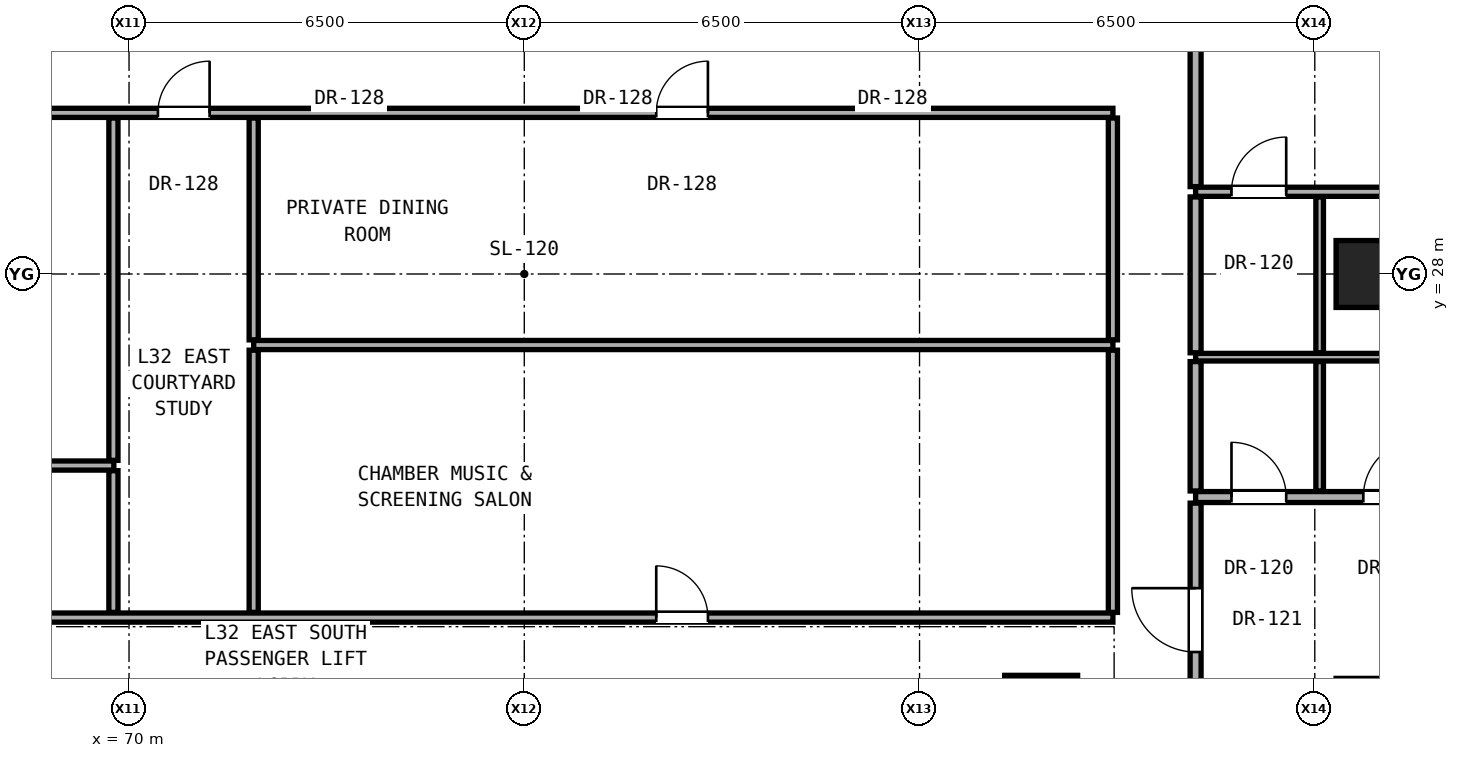
"""IFC4 building model, lengths in metres.
Left out: names, types, materials, properties, quantities, classifications, styles, units other than length and angle.
Written with IfcOpenShell. Run it as: python <this file> out.ifc"""

import sys

from ifc_helpers import new_model, si_unit, direction, frame, frame_2d, origin, origin_2d, place, context, subcontext, project, spatial, rectangle, hollow_rectangle, extrude, element, fill, save


model = new_model("IFC4")
c1 = context("Model", 3, precision=1e-05, world=origin(), true_north=direction((0.0, 1.0)))
c2 = subcontext(c1, "Body", "Model", "MODEL_VIEW")
j1 = project(units=[si_unit("LENGTHUNIT", "METRE"), si_unit("PLANEANGLEUNIT", "RADIAN")], contexts=[c1])
p1 = place(None, origin())
s1 = spatial("IfcSite", under=j1, at=p1, CompositionType="ELEMENT")
p2 = place(p1, origin())
s2 = spatial("IfcBuilding", under=s1, at=p2, CompositionType="ELEMENT")
p3 = place(p2, frame((0.0, 0.0, 114.8)))
s3 = spatial("IfcBuildingStorey", under=s2, at=p3, CompositionType="ELEMENT", Elevation=114.8)
p4 = place(p3, frame((85.0, 20.8, 0.0), z_axis=(0.0, 0.0, 1.0), x_axis=(1.0, 0.0, 0.0)))
e1 = element("IfcColumn", 1, at=p4, inside=s3, PredefinedType="COLUMN", context=c2, shape_type="SweptSolid", body=[
    extrude(rectangle(XDim=1.2, YDim=1.2, at=origin_2d()), origin(), (0.0, 0.0, 1.0), 3.3),
])
p5 = place(p3, frame((90.4, 28.0, 0.0), z_axis=(0.0, 0.0, 1.0), x_axis=(1.0, 0.0, 0.0)))
e2 = element("IfcColumn", 2, at=p5, inside=s3, PredefinedType="COLUMN", context=c2, shape_type="SweptSolid", body=[
    extrude(hollow_rectangle(XDim=1.1, YDim=1.1, WallThickness=0.06, at=origin_2d()), origin(), (0.0, 0.0, 1.0), 3.3),
])
p6 = place(p3, frame((66.68, 22.35, 0.0), z_axis=(0.0, 0.0, 1.0), x_axis=(1.0, 0.0, 0.0)))
e3 = element("IfcWall", 3, at=p6, inside=s3, PredefinedType="PARTITIONING", context=c2, shape_type="SweptSolid", body=[
    extrude(rectangle(XDim=19.5, YDim=0.15, at=frame_2d((9.75, 0.0))), origin(), (0.0, 0.0, 1.0), 2.145),
])
p7 = place(p6, frame((11.99, 0.0, 0.0)))
e4 = element("IfcOpeningElement", 4, at=p7, cuts=e3, PredefinedType="OPENING", context=c2, shape_type="SweptSolid", body=[
    extrude(rectangle(XDim=0.85, YDim=2.01, at=frame_2d((0.425, 1.005))), frame((0.0, 0.085, 0.0), z_axis=(0.0, -1.0, 0.0), x_axis=(1.0, 0.0, 0.0)), (0.0, 0.0, 1.0), 0.17),
])
p8 = place(p3, frame((87.54, 24.332, 0.0), z_axis=(0.0, 0.0, 1.0), x_axis=(1.0, 0.0, 0.0)))
e5 = element("IfcWall", 5, at=p8, inside=s3, PredefinedType="PARTITIONING", context=c2, shape_type="SweptSolid", body=[
    extrude(rectangle(XDim=8.006, YDim=0.18, at=frame_2d((4.003, 0.0))), origin(), (0.0, 0.0, 1.0), 2.216),
])
p9 = place(p8, frame((5.721, 0.0, 0.0)))
e6 = element("IfcOpeningElement", 6, at=p9, cuts=e5, PredefinedType="OPENING", context=c2, shape_type="SweptSolid", body=[
    extrude(rectangle(XDim=0.95, YDim=2.15, at=frame_2d((0.475, 1.075))), frame((0.0, 0.1, 0.0), z_axis=(0.0, -1.0, 0.0), x_axis=(1.0, 0.0, 0.0)), (0.0, 0.0, 1.0), 0.2),
])
p10 = place(p8, frame((2.758, 0.0, 0.0)))
e7 = element("IfcOpeningElement", 7, at=p10, cuts=e5, PredefinedType="OPENING", context=c2, shape_type="SweptSolid", body=[
    extrude(rectangle(XDim=0.95, YDim=2.15, at=frame_2d((0.475, 1.075))), frame((0.0, 0.1, 0.0), z_axis=(0.0, -1.0, 0.0), x_axis=(1.0, 0.0, 0.0)), (0.0, 0.0, 1.0), 0.2),
])
p11 = place(p8, frame((0.59, 0.0, 0.0)))
e8 = element("IfcOpeningElement", 8, at=p11, cuts=e5, PredefinedType="OPENING", context=c2, shape_type="SweptSolid", body=[
    extrude(rectangle(XDim=0.9, YDim=2.1, at=frame_2d((0.45, 1.05))), frame((0.0, 0.1, 0.0), z_axis=(0.0, -1.0, 0.0), x_axis=(1.0, 0.0, 0.0)), (0.0, 0.0, 1.0), 0.2),
])
p12 = place(p3, frame((66.68, 24.85, 0.0), z_axis=(0.0, 0.0, 1.0), x_axis=(1.0, 0.0, 0.0)))
e9 = element("IfcWall", 9, at=p12, inside=s3, PredefinedType="PARTITIONING", context=c2, shape_type="SweptSolid", body=[
    extrude(rectangle(XDim=3.07, YDim=0.15, at=frame_2d((1.535, 0.0))), origin(), (0.0, 0.0, 1.0), 2.145),
])
p13 = place(p3, frame((87.54, 26.632, 0.0), z_axis=(0.0, 0.0, 1.0), x_axis=(1.0, 0.0, 0.0)))
e10 = element("IfcWall", 10, at=p13, inside=s3, PredefinedType="PARTITIONING", context=c2, shape_type="SweptSolid", body=[
    extrude(rectangle(XDim=8.006, YDim=0.125, at=frame_2d((4.003, 0.0))), origin(), (0.0, 0.0, 1.0), 2.216),
])
p14 = place(p3, frame((72.05, 26.832, 0.0), z_axis=(0.0, 0.0, 1.0), x_axis=(1.0, 0.0, 0.0)))
e11 = element("IfcWall", 11, at=p14, inside=s3, PredefinedType="PARTITIONING", context=c2, shape_type="SweptSolid", body=[
    extrude(rectangle(XDim=14.13, YDim=0.15, at=frame_2d((7.065, 0.0))), origin(), (0.0, 0.0, 1.0), 2.145),
])
p15 = place(p3, frame((87.54, 29.352, 0.0), z_axis=(0.0, 0.0, 1.0), x_axis=(1.0, 0.0, 0.0)))
e12 = element("IfcWall", 12, at=p15, inside=s3, PredefinedType="PARTITIONING", context=c2, shape_type="SweptSolid", body=[
    extrude(rectangle(XDim=8.006, YDim=0.15, at=frame_2d((4.003, 0.0))), origin(), (0.0, 0.0, 1.0), 2.216),
])
p16 = place(p15, frame((4.528, 0.0, 0.0)))
e13 = element("IfcOpeningElement", 13, at=p16, cuts=e12, PredefinedType="OPENING", context=c2, shape_type="SweptSolid", body=[
    extrude(rectangle(XDim=0.95, YDim=2.15, at=frame_2d((0.475, 1.075))), frame((0.0, 0.085, 0.0), z_axis=(0.0, -1.0, 0.0), x_axis=(1.0, 0.0, 0.0)), (0.0, 0.0, 1.0), 0.17),
])
p17 = place(p15, frame((0.59, 0.0, 0.0)))
e14 = element("IfcOpeningElement", 14, at=p17, cuts=e12, PredefinedType="OPENING", context=c2, shape_type="SweptSolid", body=[
    extrude(rectangle(XDim=0.9, YDim=2.1, at=frame_2d((0.45, 1.05))), frame((0.0, 0.085, 0.0), z_axis=(0.0, -1.0, 0.0), x_axis=(1.0, 0.0, 0.0)), (0.0, 0.0, 1.0), 0.17),
])
p18 = place(p3, frame((66.68, 30.65, 0.0), z_axis=(0.0, 0.0, 1.0), x_axis=(1.0, 0.0, 0.0)))
e15 = element("IfcWall", 15, at=p18, inside=s3, PredefinedType="PARTITIONING", context=c2, shape_type="SweptSolid", body=[
    extrude(rectangle(XDim=19.5, YDim=0.15, at=frame_2d((9.75, 0.0))), origin(), (0.0, 0.0, 1.0), 2.145),
])
p19 = place(p18, frame((3.795, 0.0, 0.0)))
e16 = element("IfcOpeningElement", 16, at=p19, cuts=e15, PredefinedType="OPENING", context=c2, shape_type="SweptSolid", body=[
    extrude(rectangle(XDim=0.85, YDim=2.01, at=frame_2d((0.425, 1.005))), frame((0.0, 0.085, 0.0), z_axis=(0.0, -1.0, 0.0), x_axis=(1.0, 0.0, 0.0)), (0.0, 0.0, 1.0), 0.17),
])
p20 = place(p18, frame((11.99, 0.0, 0.0)))
e17 = element("IfcOpeningElement", 17, at=p20, cuts=e15, PredefinedType="OPENING", context=c2, shape_type="SweptSolid", body=[
    extrude(rectangle(XDim=0.85, YDim=2.01, at=frame_2d((0.425, 1.005))), frame((0.0, 0.085, 0.0), z_axis=(0.0, -1.0, 0.0), x_axis=(1.0, 0.0, 0.0)), (0.0, 0.0, 1.0), 0.17),
])
p21 = place(p3, frame((69.743, 22.435, 0.0), z_axis=(0.0, 0.0, 1.0), x_axis=(0.0, 1.0, 0.0)))
e18 = element("IfcWall", 18, at=p21, inside=s3, PredefinedType="PARTITIONING", context=c2, shape_type="SweptSolid", body=[
    extrude(rectangle(XDim=2.33, YDim=0.15, at=frame_2d((1.165, 0.0))), origin(), (0.0, 0.0, 1.0), 3.08),
])
p22 = place(p3, frame((69.743, 24.935, 0.0), z_axis=(0.0, 0.0, 1.0), x_axis=(0.0, 1.0, 0.0)))
e19 = element("IfcWall", 19, at=p22, inside=s3, PredefinedType="PARTITIONING", context=c2, shape_type="SweptSolid", body=[
    extrude(rectangle(XDim=5.63, YDim=0.15, at=frame_2d((2.815, 0.0))), origin(), (0.0, 0.0, 1.0), 2.145),
])
p23 = place(p3, frame((72.05, 22.435, 0.0), z_axis=(0.0, 0.0, 1.0), x_axis=(0.0, 1.0, 0.0)))
e20 = element("IfcWall", 20, at=p23, inside=s3, PredefinedType="PARTITIONING", context=c2, shape_type="SweptSolid", body=[
    extrude(rectangle(XDim=4.312, YDim=0.15, at=frame_2d((2.156, 0.0))), origin(), (0.0, 0.0, 1.0), 2.609),
])
p24 = place(p3, frame((72.05, 26.917, 0.0), z_axis=(0.0, 0.0, 1.0), x_axis=(0.0, 1.0, 0.0)))
e21 = element("IfcWall", 21, at=p24, inside=s3, PredefinedType="PARTITIONING", context=c2, shape_type="SweptSolid", body=[
    extrude(rectangle(XDim=3.648, YDim=0.15, at=frame_2d((1.824, 0.0))), origin(), (0.0, 0.0, 1.0), 2.145),
])
p25 = place(p3, frame((86.18, 22.435, 0.0), z_axis=(0.0, 0.0, 1.0), x_axis=(0.0, 1.0, 0.0)))
e22 = element("IfcWall", 22, at=p25, inside=s3, PredefinedType="PARTITIONING", context=c2, shape_type="SweptSolid", body=[
    extrude(rectangle(XDim=4.312, YDim=0.15, at=frame_2d((2.156, 0.0))), origin(), (0.0, 0.0, 1.0), 3.08),
])
p26 = place(p3, frame((86.18, 26.917, 0.0), z_axis=(0.0, 0.0, 1.0), x_axis=(0.0, 1.0, 0.0)))
e23 = element("IfcWall", 23, at=p26, inside=s3, PredefinedType="PARTITIONING", context=c2, shape_type="SweptSolid", body=[
    extrude(rectangle(XDim=3.648, YDim=0.15, at=frame_2d((1.824, 0.0))), origin(), (0.0, 0.0, 1.0), 2.299),
])
p27 = place(p3, frame((87.54, 20.385, 0.0), z_axis=(0.0, 0.0, 1.0), x_axis=(0.0, 1.0, 0.0)))
e24 = element("IfcWall", 24, at=p27, inside=s3, PredefinedType="PARTITIONING", context=c2, shape_type="SweptSolid", body=[
    extrude(rectangle(XDim=3.847, YDim=0.18, at=frame_2d((1.923, 0.0))), origin(), (0.0, 0.0, 1.0), 2.472),
])
p28 = place(p27, frame((1.398, 0.0, 0.0)))
e25 = element("IfcOpeningElement", 25, at=p28, cuts=e24, PredefinedType="OPENING", context=c2, shape_type="SweptSolid", body=[
    extrude(rectangle(XDim=1.05, YDim=2.2, at=frame_2d((0.525, 1.1))), frame((0.0, 0.1, 0.0), z_axis=(0.0, -1.0, 0.0), x_axis=(1.0, 0.0, 0.0)), (0.0, 0.0, 1.0), 0.2),
])
p29 = place(p3, frame((87.54, 24.432, 0.0), z_axis=(0.0, 0.0, 1.0), x_axis=(0.0, 1.0, 0.0)))
e26 = element("IfcWall", 26, at=p29, inside=s3, PredefinedType="PARTITIONING", context=c2, shape_type="SweptSolid", body=[
    extrude(rectangle(XDim=2.128, YDim=0.18, at=frame_2d((1.064, 0.0))), origin(), (0.0, 0.0, 1.0), 3.08),
])
p30 = place(p3, frame((87.54, 26.705, 0.0), z_axis=(0.0, 0.0, 1.0), x_axis=(0.0, 1.0, 0.0)))
e27 = element("IfcWall", 27, at=p30, inside=s3, PredefinedType="PARTITIONING", context=c2, shape_type="SweptSolid", body=[
    extrude(rectangle(XDim=2.562, YDim=0.18, at=frame_2d((1.281, 0.0))), origin(), (0.0, 0.0, 1.0), 2.299),
])
p31 = place(p3, frame((87.54, 29.437, 0.0), z_axis=(0.0, 0.0, 1.0), x_axis=(0.0, 1.0, 0.0)))
e28 = element("IfcWall", 28, at=p31, inside=s3, PredefinedType="PARTITIONING", context=c2, shape_type="SweptSolid", body=[
    extrude(rectangle(XDim=6.178, YDim=0.18, at=frame_2d((3.089, 0.0))), origin(), (0.0, 0.0, 1.0), 2.472),
])
p32 = place(p31, frame((2.564, 0.0, 0.0)))
e29 = element("IfcOpeningElement", 29, at=p32, cuts=e28, PredefinedType="OPENING", context=c2, shape_type="SweptSolid", body=[
    extrude(rectangle(XDim=1.05, YDim=2.2, at=frame_2d((0.525, 1.1))), frame((0.0, 0.1, 0.0), z_axis=(0.0, -1.0, 0.0), x_axis=(1.0, 0.0, 0.0)), (0.0, 0.0, 1.0), 0.2),
])
p33 = place(p3, frame((89.58, 24.432, 0.0), z_axis=(0.0, 0.0, 1.0), x_axis=(0.0, 1.0, 0.0)))
e30 = element("IfcWall", 30, at=p33, inside=s3, PredefinedType="PARTITIONING", context=c2, shape_type="SweptSolid", body=[
    extrude(rectangle(XDim=2.128, YDim=0.125, at=frame_2d((1.064, 0.0))), origin(), (0.0, 0.0, 1.0), 3.08),
])
p34 = place(p3, frame((89.58, 26.705, 0.0), z_axis=(0.0, 0.0, 1.0), x_axis=(0.0, 1.0, 0.0)))
e31 = element("IfcWall", 31, at=p34, inside=s3, PredefinedType="PARTITIONING", context=c2, shape_type="SweptSolid", body=[
    extrude(rectangle(XDim=2.562, YDim=0.125, at=frame_2d((1.281, 0.0))), origin(), (0.0, 0.0, 1.0), 2.299),
])
p35 = place(p28, origin())
e32 = element("IfcDoor", 32, at=p35, inside=s3, OperationType="SINGLE_SWING_RIGHT", PredefinedType="DOOR", context=c2, shape_type="SweptSolid", body=[
    extrude(rectangle(XDim=1.05, YDim=2.2, at=frame_2d((0.525, 1.1))), frame((0.0, 0.025, 0.0), z_axis=(0.0, -1.0, 0.0), x_axis=(1.0, 0.0, 0.0)), (0.0, 0.0, 1.0), 0.05),
])
fill(e25, e32)
p36 = place(p10, origin())
e33 = element("IfcDoor", 33, at=p36, inside=s3, OperationType="SINGLE_SWING_RIGHT", PredefinedType="DOOR", context=c2, shape_type="SweptSolid", body=[
    extrude(rectangle(XDim=0.95, YDim=2.15, at=frame_2d((0.475, 1.075))), frame((0.0, 0.025, 0.0), z_axis=(0.0, -1.0, 0.0), x_axis=(1.0, 0.0, 0.0)), (0.0, 0.0, 1.0), 0.05),
])
fill(e7, e33)
p37 = place(p11, origin())
e34 = element("IfcDoor", 34, at=p37, inside=s3, OperationType="SINGLE_SWING_LEFT", PredefinedType="DOOR", context=c2, shape_type="SweptSolid", body=[
    extrude(rectangle(XDim=0.9, YDim=2.1, at=frame_2d((0.45, 1.05))), frame((0.0, 0.025, 0.0), z_axis=(0.0, -1.0, 0.0), x_axis=(1.0, 0.0, 0.0)), (0.0, 0.0, 1.0), 0.05),
])
fill(e8, e34)
p38 = place(p17, origin())
e35 = element("IfcDoor", 35, at=p38, inside=s3, OperationType="SINGLE_SWING_RIGHT", PredefinedType="DOOR", context=c2, shape_type="SweptSolid", body=[
    extrude(rectangle(XDim=0.9, YDim=2.1, at=frame_2d((0.45, 1.05))), frame((0.0, 0.025, 0.0), z_axis=(0.0, -1.0, 0.0), x_axis=(1.0, 0.0, 0.0)), (0.0, 0.0, 1.0), 0.05),
])
fill(e14, e35)
p39 = place(p19, origin())
e36 = element("IfcDoor", 36, at=p39, inside=s3, OperationType="SINGLE_SWING_RIGHT", PredefinedType="DOOR", context=c2, shape_type="SweptSolid", body=[
    extrude(rectangle(XDim=0.85, YDim=2.01, at=frame_2d((0.425, 1.005))), frame((0.0, 0.025, 0.0), z_axis=(0.0, -1.0, 0.0), x_axis=(1.0, 0.0, 0.0)), (0.0, 0.0, 1.0), 0.05),
])
fill(e16, e36)
p40 = place(p7, origin())
e37 = element("IfcDoor", 37, at=p40, inside=s3, OperationType="SINGLE_SWING_LEFT", PredefinedType="DOOR", context=c2, shape_type="SweptSolid", body=[
    extrude(rectangle(XDim=0.85, YDim=2.01, at=frame_2d((0.425, 1.005))), frame((0.0, 0.025, 0.0), z_axis=(0.0, -1.0, 0.0), x_axis=(1.0, 0.0, 0.0)), (0.0, 0.0, 1.0), 0.05),
])
fill(e4, e37)
p41 = place(p20, origin())
e38 = element("IfcDoor", 38, at=p41, inside=s3, OperationType="SINGLE_SWING_RIGHT", PredefinedType="DOOR", context=c2, shape_type="SweptSolid", body=[
    extrude(rectangle(XDim=0.85, YDim=2.01, at=frame_2d((0.425, 1.005))), frame((0.0, 0.025, 0.0), z_axis=(0.0, -1.0, 0.0), x_axis=(1.0, 0.0, 0.0)), (0.0, 0.0, 1.0), 0.05),
])
fill(e17, e38)
save(model, sys.argv[1])
